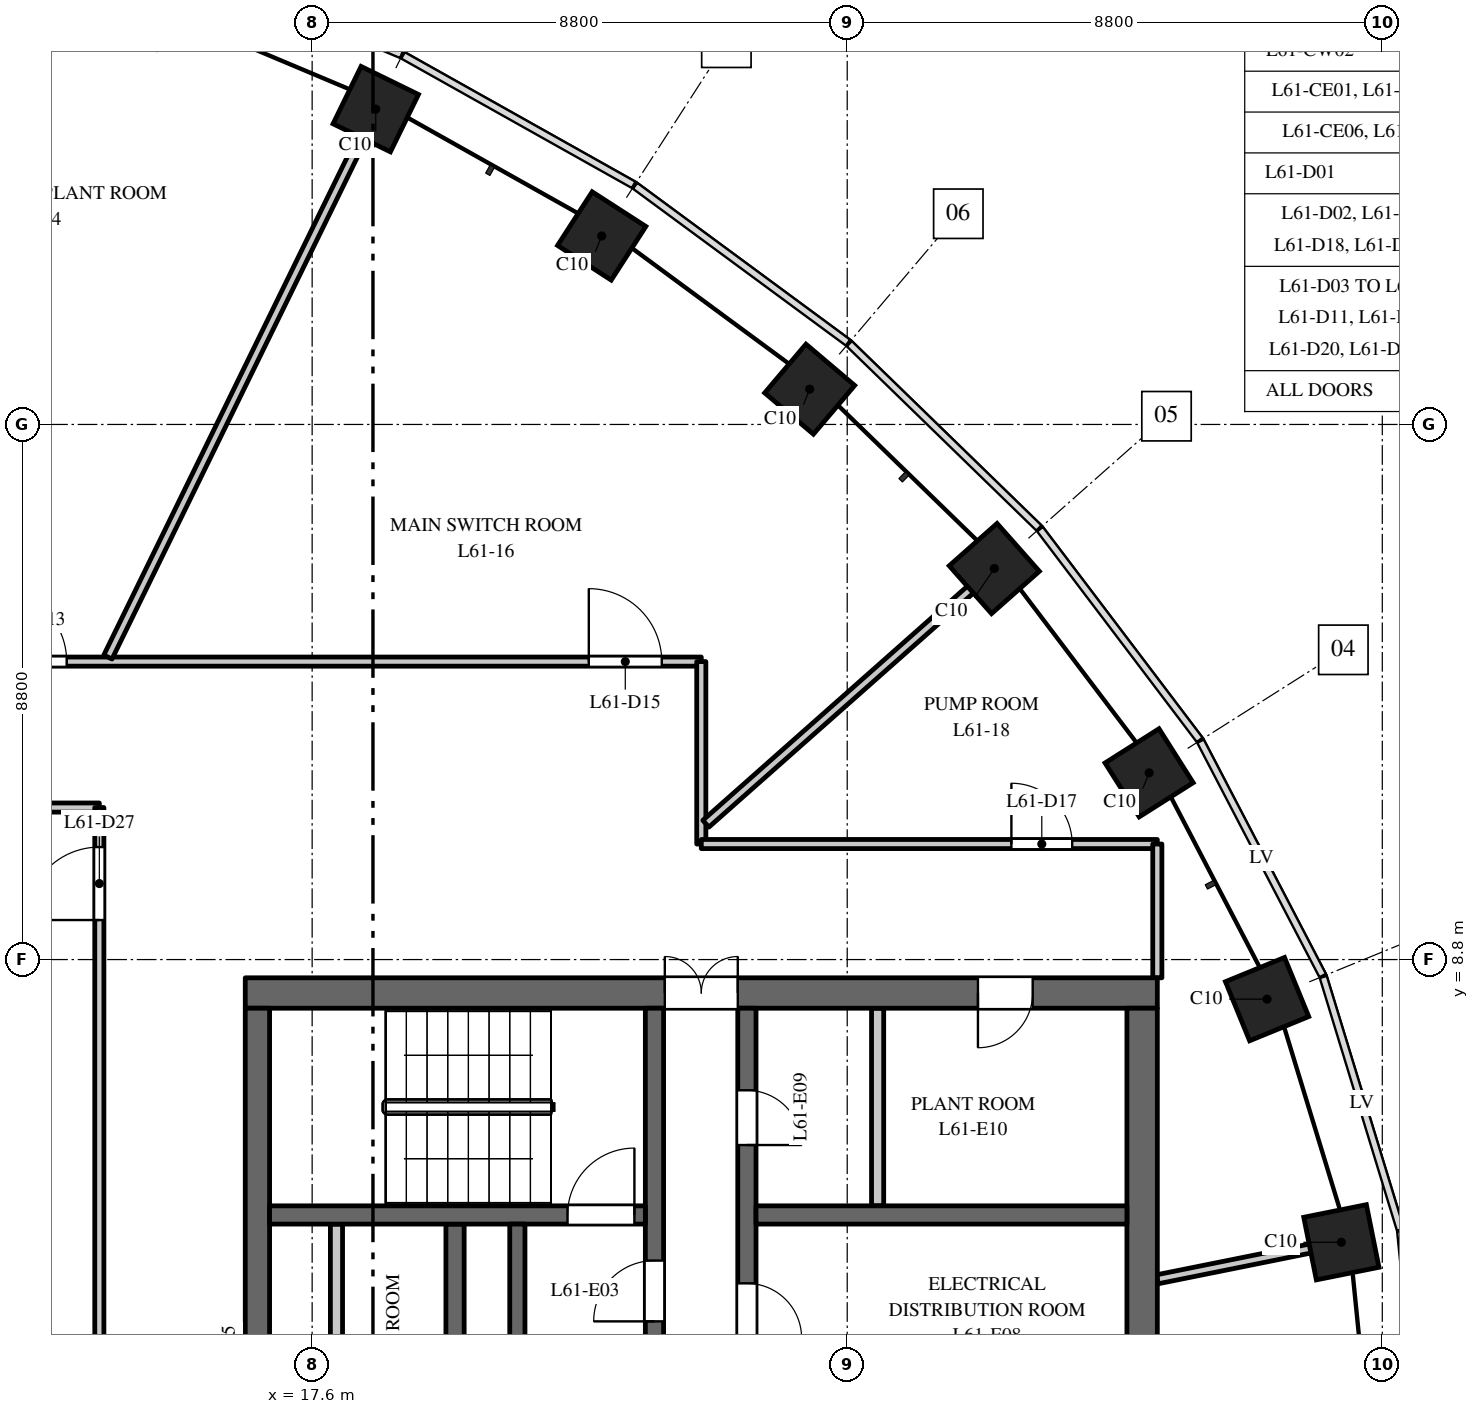
"""IFC4 building model, lengths in metres.
Left out: names, types, materials, properties, quantities, classifications, styles, units other than length and angle.
Written with IfcOpenShell. Run it as: python <this file> out.ifc"""

import sys

from ifc_helpers import new_model, si_unit, direction, frame, frame_2d, origin, origin_2d, place, context, subcontext, project, spatial, rectangle, extrude, element, fill, save


model = new_model("IFC4")
c1 = context("Model", 3, precision=1e-05, world=origin(), true_north=direction((0.0, 1.0)))
c2 = subcontext(c1, "Body", "Model", "MODEL_VIEW")
j1 = project(units=[si_unit("LENGTHUNIT", "METRE"), si_unit("PLANEANGLEUNIT", "RADIAN")], contexts=[c1])
p1 = place(None, origin())
s1 = spatial("IfcSite", under=j1, at=p1, CompositionType="ELEMENT")
p2 = place(p1, origin())
s2 = spatial("IfcBuilding", under=s1, at=p2, CompositionType="ELEMENT")
p3 = place(p2, frame((0.0, 0.0, 285.5)))
s3 = spatial("IfcBuildingStorey", under=s2, at=p3, CompositionType="ELEMENT", Elevation=285.5)
for number, where, z_axis, x_axis in (
    (1, (34.527, 4.151, 0.0), (0.0, 0.0, 1.0), (-0.197, 0.98, 0.0)),
    (2, (33.305, 8.149, 0.0), (0.0, 0.0, 1.0), (-0.379, 0.925, 0.0)),
    (3, (31.365, 11.871, 0.0), (0.0, 0.0, 1.0), (-0.535, 0.845, 0.0)),
    (4, (28.819, 15.23, 0.0), (0.0, 0.0, 1.0), (-0.663, 0.749, 0.0)),
    (5, (25.783, 18.18, 0.0), (0.0, 0.0, 1.0), (-0.763, 0.646, 0.0)),
    (6, (22.362, 20.7, 0.0), (0.0, 0.0, 1.0), (-0.84, 0.542, 0.0)),
    (7, (18.646, 22.785, 0.0), (0.0, 0.0, 1.0), (-0.898, 0.439, 0.0)),
):
    element("IfcColumn", number, at=place(p3, frame(where, z_axis=z_axis, x_axis=x_axis)), inside=s3, PredefinedType="COLUMN", context=c2, shape_type="SweptSolid", body=[
        extrude(rectangle(XDim=1.05, YDim=1.05, at=origin_2d()), origin(), (0.0, 0.0, 1.0), 5.5),
    ])
p4 = place(p3, frame((16.5, 8.25, 0.0), z_axis=(0.0, 0.0, 1.0), x_axis=(1.0, 0.0, 0.0)))
e8 = element("IfcWall", 8, at=p4, inside=s3, PredefinedType="SHEAR", context=c2, shape_type="SweptSolid", body=[
    extrude(rectangle(XDim=15.0, YDim=0.5, at=frame_2d((7.5, 0.0))), origin(), (0.0, 0.0, 1.0), 5.2),
])
p5 = place(p4, frame((6.9, 0.0, 0.0)))
e9 = element("IfcOpeningElement", 9, at=p5, cuts=e8, PredefinedType="OPENING", context=c2, shape_type="SweptSolid", body=[
    extrude(rectangle(XDim=1.2, YDim=2.1, at=frame_2d((0.6, 1.05))), frame((0.0, 0.26, 0.0), z_axis=(0.0, -1.0, 0.0), x_axis=(1.0, 0.0, 0.0)), (0.0, 0.0, 1.0), 0.52),
])
p6 = place(p4, frame((12.05, 0.0, 0.0)))
e10 = element("IfcOpeningElement", 10, at=p6, cuts=e8, PredefinedType="OPENING", context=c2, shape_type="SweptSolid", body=[
    extrude(rectangle(XDim=0.9, YDim=2.1, at=frame_2d((0.45, 1.05))), frame((0.0, 0.26, 0.0), z_axis=(0.0, -1.0, 0.0), x_axis=(1.0, 0.0, 0.0)), (0.0, 0.0, 1.0), 0.52),
])
p7 = place(p3, frame((18.0, -0.45, 0.0), z_axis=(0.0, 0.0, 1.0), x_axis=(0.0, 1.0, 0.0)))
e11 = element("IfcWall", 11, at=p7, inside=s3, PredefinedType="PARTITIONING", context=c2, shape_type="SweptSolid", body=[
    extrude(rectangle(XDim=4.9, YDim=0.2, at=frame_2d((2.45, 0.0))), origin(), (0.0, 0.0, 1.0), 5.2),
])
p8 = place(p7, frame((2.0, 0.0, 0.0)))
e12 = element("IfcOpeningElement", 12, at=p8, cuts=e11, PredefinedType="OPENING", context=c2, shape_type="SweptSolid", body=[
    extrude(rectangle(XDim=0.9, YDim=2.1, at=frame_2d((0.45, 1.05))), frame((0.0, 0.11, 0.0), z_axis=(0.0, -1.0, 0.0), x_axis=(1.0, 0.0, 0.0)), (0.0, 0.0, 1.0), 0.22),
])
p9 = place(p3, frame((19.95, -4.45, 0.0), z_axis=(0.0, 0.0, 1.0), x_axis=(0.0, 1.0, 0.0)))
e13 = element("IfcWall", 13, at=p9, inside=s3, PredefinedType="SHEAR", context=c2, shape_type="SweptSolid", body=[
    extrude(rectangle(XDim=8.9, YDim=0.3, at=frame_2d((4.45, 0.0))), origin(), (0.0, 0.0, 1.0), 5.2),
])
p10 = place(p9, frame((0.775, 0.0, 0.0)))
e14 = element("IfcOpeningElement", 14, at=p10, cuts=e13, PredefinedType="OPENING", context=c2, shape_type="SweptSolid", body=[
    extrude(rectangle(XDim=1.2, YDim=2.1, at=frame_2d((0.6, 1.05))), frame((0.0, 0.16, 0.0), z_axis=(0.0, -1.0, 0.0), x_axis=(1.0, 0.0, 0.0)), (0.0, 0.0, 1.0), 0.32),
])
p11 = place(p9, frame((6.0, 0.0, 0.0)))
e15 = element("IfcOpeningElement", 15, at=p11, cuts=e13, PredefinedType="OPENING", context=c2, shape_type="SweptSolid", body=[
    extrude(rectangle(XDim=0.9, YDim=2.1, at=frame_2d((0.45, 1.05))), frame((0.0, 0.16, 0.0), z_axis=(0.0, -1.0, 0.0), x_axis=(1.0, 0.0, 0.0)), (0.0, 0.0, 1.0), 0.32),
])
p12 = place(p3, frame((24.75, -8.0, 0.0), z_axis=(0.0, 0.0, 1.0), x_axis=(0.0, 1.0, 0.0)))
e16 = element("IfcWall", 16, at=p12, inside=s3, PredefinedType="SHEAR", context=c2, shape_type="SweptSolid", body=[
    extrude(rectangle(XDim=16.0, YDim=0.3, at=frame_2d((8.0, 0.0))), origin(), (0.0, 0.0, 1.0), 5.2),
])
p13 = place(p12, frame((4.525, 0.0, 0.0)))
e17 = element("IfcOpeningElement", 17, at=p13, cuts=e16, PredefinedType="OPENING", context=c2, shape_type="SweptSolid", body=[
    extrude(rectangle(XDim=0.9, YDim=2.1, at=frame_2d((0.45, 1.05))), frame((0.0, 0.16, 0.0), z_axis=(0.0, -1.0, 0.0), x_axis=(1.0, 0.0, 0.0)), (0.0, 0.0, 1.0), 0.32),
])
p14 = place(p12, frame((7.55, 0.0, 0.0)))
e18 = element("IfcOpeningElement", 18, at=p14, cuts=e16, PredefinedType="OPENING", context=c2, shape_type="SweptSolid", body=[
    extrude(rectangle(XDim=0.9, YDim=2.1, at=frame_2d((0.45, 1.05))), frame((0.0, 0.16, 0.0), z_axis=(0.0, -1.0, 0.0), x_axis=(1.0, 0.0, 0.0)), (0.0, 0.0, 1.0), 0.32),
])
p15 = place(p12, frame((10.575, 0.0, 0.0)))
e19 = element("IfcOpeningElement", 19, at=p15, cuts=e16, PredefinedType="OPENING", context=c2, shape_type="SweptSolid", body=[
    extrude(rectangle(XDim=0.9, YDim=2.1, at=frame_2d((0.45, 1.05))), frame((0.0, 0.16, 0.0), z_axis=(0.0, -1.0, 0.0), x_axis=(1.0, 0.0, 0.0)), (0.0, 0.0, 1.0), 0.32),
])
p16 = place(p12, frame((13.75, 0.0, 0.0)))
e20 = element("IfcOpeningElement", 20, at=p16, cuts=e16, PredefinedType="OPENING", context=c2, shape_type="SweptSolid", body=[
    extrude(rectangle(XDim=0.9, YDim=2.1, at=frame_2d((0.45, 1.05))), frame((0.0, 0.16, 0.0), z_axis=(0.0, -1.0, 0.0), x_axis=(1.0, 0.0, 0.0)), (0.0, 0.0, 1.0), 0.32),
])
p17 = place(p12, frame((1.35, 0.0, 0.0)))
e21 = element("IfcOpeningElement", 21, at=p17, cuts=e16, PredefinedType="OPENING", context=c2, shape_type="SweptSolid", body=[
    extrude(rectangle(XDim=0.9, YDim=2.1, at=frame_2d((0.45, 1.05))), frame((0.0, 0.16, 0.0), z_axis=(0.0, -1.0, 0.0), x_axis=(1.0, 0.0, 0.0)), (0.0, 0.0, 1.0), 0.32),
])
p18 = place(p3, frame((16.7, -8.0, 0.0), z_axis=(0.0, 0.0, 1.0), x_axis=(0.0, 1.0, 0.0)))
e22 = element("IfcWall", 22, at=p18, inside=s3, PredefinedType="SHEAR", context=c2, shape_type="SweptSolid", body=[
    extrude(rectangle(XDim=16.0, YDim=0.4, at=frame_2d((8.0, 0.0))), origin(), (0.0, 0.0, 1.0), 5.2),
])
p19 = place(p3, frame((31.25, -8.0, 0.0), z_axis=(0.0, 0.0, 1.0), x_axis=(0.0, 1.0, 0.0)))
e23 = element("IfcWall", 23, at=p19, inside=s3, PredefinedType="SHEAR", context=c2, shape_type="SweptSolid", body=[
    extrude(rectangle(XDim=16.0, YDim=0.5, at=frame_2d((8.0, 0.0))), origin(), (0.0, 0.0, 1.0), 5.2),
])
p20 = place(p3, frame((24.9, 4.6, 0.0), z_axis=(0.0, 0.0, 1.0), x_axis=(1.0, 0.0, 0.0)))
e24 = element("IfcWall", 24, at=p20, inside=s3, PredefinedType="SHEAR", context=c2, shape_type="SweptSolid", body=[
    extrude(rectangle(XDim=6.1, YDim=0.3, at=frame_2d((3.05, 0.0))), origin(), (0.0, 0.0, 1.0), 5.2),
])
p21 = place(p3, frame((26.9, 4.75, 0.0), z_axis=(0.0, 0.0, 1.0), x_axis=(0.0, 1.0, 0.0)))
e25 = element("IfcWall", 25, at=p21, inside=s3, PredefinedType="PARTITIONING", context=c2, shape_type="SweptSolid", body=[
    extrude(rectangle(XDim=3.25, YDim=0.2, at=frame_2d((1.625, 0.0))), origin(), (0.0, 0.0, 1.0), 5.2),
])
p22 = place(p3, frame((23.23, 2.25, 0.0), z_axis=(0.0, 0.0, 1.0), x_axis=(0.0, 1.0, 0.0)))
e26 = element("IfcWall", 26, at=p22, inside=s3, PredefinedType="SHEAR", context=c2, shape_type="SweptSolid", body=[
    extrude(rectangle(XDim=5.75, YDim=0.3, at=frame_2d((2.875, 0.0))), origin(), (0.0, 0.0, 1.0), 5.2),
])
p23 = place(p22, frame((0.6, 0.0, 0.0)))
e27 = element("IfcOpeningElement", 27, at=p23, cuts=e26, PredefinedType="OPENING", context=c2, shape_type="SweptSolid", body=[
    extrude(rectangle(XDim=1.0, YDim=2.1, at=frame_2d((0.5, 1.05))), frame((0.0, 0.16, 0.0), z_axis=(0.0, -1.0, 0.0), x_axis=(1.0, 0.0, 0.0)), (0.0, 0.0, 1.0), 0.32),
])
p24 = place(p3, frame((16.9, 4.6, 0.0), z_axis=(0.0, 0.0, 1.0), x_axis=(1.0, 0.0, 0.0)))
e28 = element("IfcWall", 28, at=p24, inside=s3, PredefinedType="SHEAR", context=c2, shape_type="SweptSolid", body=[
    extrude(rectangle(XDim=6.18, YDim=0.3, at=frame_2d((3.09, 0.0))), origin(), (0.0, 0.0, 1.0), 5.2),
])
p25 = place(p24, frame((4.9, 0.0, 0.0)))
e29 = element("IfcOpeningElement", 29, at=p25, cuts=e28, PredefinedType="OPENING", context=c2, shape_type="SweptSolid", body=[
    extrude(rectangle(XDim=1.1, YDim=2.1, at=frame_2d((0.55, 1.05))), frame((0.0, 0.16, 0.0), z_axis=(0.0, -1.0, 0.0), x_axis=(1.0, 0.0, 0.0)), (0.0, 0.0, 1.0), 0.32),
])
p26 = place(p3, frame((20.975, 2.25, 0.0), z_axis=(0.0, 0.0, 1.0), x_axis=(0.0, 1.0, 0.0)))
e30 = element("IfcWall", 30, at=p26, inside=s3, PredefinedType="SHEAR", context=c2, shape_type="SweptSolid", body=[
    extrude(rectangle(XDim=2.2, YDim=0.25, at=frame_2d((1.1, 0.0))), origin(), (0.0, 0.0, 1.0), 5.2),
])
p27 = place(p3, frame((-14.1, 11.3, 0.0), z_axis=(0.0, 0.0, 1.0), x_axis=(1.0, 0.0, 0.0)))
e31 = element("IfcWall", 31, at=p27, inside=s3, PredefinedType="PARTITIONING", context=c2, shape_type="SweptSolid", body=[
    extrude(rectangle(XDim=28.2, YDim=0.15, at=frame_2d((14.1, 0.0))), origin(), (0.0, 0.0, 1.0), 4.35),
])
p28 = place(p27, frame((12.08, 0.0, 0.0)))
e32 = element("IfcOpeningElement", 32, at=p28, cuts=e31, PredefinedType="OPENING", context=c2, shape_type="SweptSolid", body=[
    extrude(rectangle(XDim=1.0, YDim=2.1, at=frame_2d((0.5, 1.05))), frame((0.0, 0.085, 0.0), z_axis=(0.0, -1.0, 0.0), x_axis=(1.0, 0.0, 0.0)), (0.0, 0.0, 1.0), 0.17),
])
p29 = place(p27, frame((16.78, 0.0, 0.0)))
e33 = element("IfcOpeningElement", 33, at=p29, cuts=e31, PredefinedType="OPENING", context=c2, shape_type="SweptSolid", body=[
    extrude(rectangle(XDim=1.0, YDim=2.1, at=frame_2d((0.5, 1.05))), frame((0.0, 0.085, 0.0), z_axis=(0.0, -1.0, 0.0), x_axis=(1.0, 0.0, 0.0)), (0.0, 0.0, 1.0), 0.17),
])
p30 = place(p27, frame((21.48, 0.0, 0.0)))
e34 = element("IfcOpeningElement", 34, at=p30, cuts=e31, PredefinedType="OPENING", context=c2, shape_type="SweptSolid", body=[
    extrude(rectangle(XDim=1.0, YDim=2.1, at=frame_2d((0.5, 1.05))), frame((0.0, 0.085, 0.0), z_axis=(0.0, -1.0, 0.0), x_axis=(1.0, 0.0, 0.0)), (0.0, 0.0, 1.0), 0.17),
])
p31 = place(p3, frame((4.58, 13.7, 0.0), z_axis=(0.0, 0.0, 1.0), x_axis=(1.0, 0.0, 0.0)))
e35 = element("IfcWall", 35, at=p31, inside=s3, PredefinedType="PARTITIONING", context=c2, shape_type="SweptSolid", body=[
    extrude(rectangle(XDim=19.42, YDim=0.15, at=frame_2d((9.71, 0.0))), origin(), (0.0, 0.0, 1.0), 4.35),
])
p32 = place(p31, frame((7.783, 0.0, 0.0)))
e36 = element("IfcOpeningElement", 36, at=p32, cuts=e35, PredefinedType="OPENING", context=c2, shape_type="SweptSolid", body=[
    extrude(rectangle(XDim=1.2, YDim=2.1, at=frame_2d((0.6, 1.05))), frame((0.0, 0.085, 0.0), z_axis=(0.0, -1.0, 0.0), x_axis=(1.0, 0.0, 0.0)), (0.0, 0.0, 1.0), 0.17),
])
p33 = place(p31, frame((17.57, 0.0, 0.0)))
e37 = element("IfcOpeningElement", 37, at=p33, cuts=e35, PredefinedType="OPENING", context=c2, shape_type="SweptSolid", body=[
    extrude(rectangle(XDim=1.2, YDim=2.1, at=frame_2d((0.6, 1.05))), frame((0.0, 0.085, 0.0), z_axis=(0.0, -1.0, 0.0), x_axis=(1.0, 0.0, 0.0)), (0.0, 0.0, 1.0), 0.17),
])
p34 = place(p3, frame((14.1, -11.3, 0.0), z_axis=(0.0, 0.0, 1.0), x_axis=(0.0, 1.0, 0.0)))
e38 = element("IfcWall", 38, at=p34, inside=s3, PredefinedType="PARTITIONING", context=c2, shape_type="SweptSolid", body=[
    extrude(rectangle(XDim=22.6, YDim=0.15, at=frame_2d((11.3, 0.0))), origin(), (0.0, 0.0, 1.0), 4.25),
])
p35 = place(p34, frame((20.75, 0.0, 0.0)))
e39 = element("IfcOpeningElement", 39, at=p35, cuts=e38, PredefinedType="OPENING", context=c2, shape_type="SweptSolid", body=[
    extrude(rectangle(XDim=1.2, YDim=2.1, at=frame_2d((0.6, 1.05))), frame((0.0, 0.085, 0.0), z_axis=(0.0, -1.0, 0.0), x_axis=(1.0, 0.0, 0.0)), (0.0, 0.0, 1.0), 0.17),
])
p36 = place(p3, frame((14.241, 13.775, 0.0), z_axis=(0.0, 0.0, 1.0), x_axis=(0.439213157978, 0.898382881548, 0.0)))
e40 = element("IfcWall", 40, at=p36, inside=s3, PredefinedType="PARTITIONING", context=c2, shape_type="SweptSolid", body=[
    extrude(rectangle(XDim=10.129, YDim=0.15, at=frame_2d((5.065, 0.0))), origin(), (0.0, 0.0, 1.0), 5.2),
])
p37 = place(p3, frame((24.0, 10.7, 0.0), z_axis=(0.0, 0.0, 1.0), x_axis=(0.0, 1.0, 0.0)))
e41 = element("IfcWall", 41, at=p37, inside=s3, PredefinedType="PARTITIONING", context=c2, shape_type="SweptSolid", body=[
    extrude(rectangle(XDim=3.0, YDim=0.15, at=frame_2d((1.5, 0.0))), origin(), (0.0, 0.0, 1.0), 4.25),
])
p38 = place(p3, frame((24.0, 10.7, 0.0), z_axis=(0.0, 0.0, 1.0), x_axis=(1.0, 0.0, 0.0)))
e42 = element("IfcWall", 42, at=p38, inside=s3, PredefinedType="PARTITIONING", context=c2, shape_type="SweptSolid", body=[
    extrude(rectangle(XDim=7.5, YDim=0.15, at=frame_2d((3.75, 0.0))), origin(), (0.0, 0.0, 1.0), 5.2),
])
p39 = place(p38, frame((5.1, 0.0, 0.0)))
e43 = element("IfcOpeningElement", 43, at=p39, cuts=e42, PredefinedType="OPENING", context=c2, shape_type="SweptSolid", body=[
    extrude(rectangle(XDim=1.0, YDim=2.1, at=frame_2d((0.5, 1.05))), frame((0.0, 0.085, 0.0), z_axis=(0.0, -1.0, 0.0), x_axis=(1.0, 0.0, 0.0)), (0.0, 0.0, 1.0), 0.17),
])
p40 = place(p3, frame((24.075, 11.034, 0.0), z_axis=(0.0, 0.0, 1.0), x_axis=(0.748919053688, 0.662661490524, 0.0)))
e44 = element("IfcWall", 44, at=p40, inside=s3, PredefinedType="PARTITIONING", context=c2, shape_type="SweptSolid", body=[
    extrude(rectangle(XDim=6.433, YDim=0.15, at=frame_2d((3.217, 0.0))), origin(), (0.0, 0.0, 1.0), 4.25),
])
p41 = place(p3, frame((31.5, 3.542, 0.0), z_axis=(0.0, 0.0, 1.0), x_axis=(0.98034430806, 0.197294291997, 0.0)))
e45 = element("IfcWall", 45, at=p41, inside=s3, PredefinedType="PARTITIONING", context=c2, shape_type="SweptSolid", body=[
    extrude(rectangle(XDim=3.188, YDim=0.15, at=frame_2d((1.594, 0.0))), origin(), (0.0, 0.0, 1.0), 5.2),
])
p42 = place(p3, frame((31.5, 8.5, 0.0), z_axis=(0.0, 0.0, 1.0), x_axis=(0.0, 1.0, 0.0)))
e46 = element("IfcWall", 46, at=p42, inside=s3, PredefinedType="PARTITIONING", context=c2, shape_type="SweptSolid", body=[
    extrude(rectangle(XDim=2.2, YDim=0.15, at=frame_2d((1.1, 0.0))), origin(), (0.0, 0.0, 1.0), 5.2),
])
p43 = place(p25, origin())
e47 = element("IfcDoor", 47, at=p43, inside=s3, OperationType="SINGLE_SWING_LEFT", PredefinedType="DOOR", context=c2, shape_type="SweptSolid", body=[
    extrude(rectangle(XDim=1.1, YDim=2.1, at=frame_2d((0.55, 1.05))), frame((0.0, 0.025, 0.0), z_axis=(0.0, -1.0, 0.0), x_axis=(1.0, 0.0, 0.0)), (0.0, 0.0, 1.0), 0.05),
])
fill(e29, e47)
p44 = place(p23, origin())
e48 = element("IfcDoor", 48, at=p44, inside=s3, OperationType="SINGLE_SWING_RIGHT", PredefinedType="DOOR", context=c2, shape_type="SweptSolid", body=[
    extrude(rectangle(XDim=1.0, YDim=2.1, at=frame_2d((0.5, 1.05))), frame((0.0, 0.025, 0.0), z_axis=(0.0, -1.0, 0.0), x_axis=(1.0, 0.0, 0.0)), (0.0, 0.0, 1.0), 0.05),
])
fill(e27, e48)
p45 = place(p5, origin())
e49 = element("IfcDoor", 49, at=p45, inside=s3, OperationType="DOUBLE_DOOR_DOUBLE_SWING", PredefinedType="DOOR", context=c2, shape_type="SweptSolid", body=[
    extrude(rectangle(XDim=1.2, YDim=2.1, at=frame_2d((0.6, 1.05))), frame((0.0, 0.025, 0.0), z_axis=(0.0, -1.0, 0.0), x_axis=(1.0, 0.0, 0.0)), (0.0, 0.0, 1.0), 0.05),
])
fill(e9, e49)
p46 = place(p15, origin())
e50 = element("IfcDoor", 50, at=p46, inside=s3, OperationType="SINGLE_SWING_LEFT", PredefinedType="DOOR", context=c2, shape_type="SweptSolid", body=[
    extrude(rectangle(XDim=0.9, YDim=2.1, at=frame_2d((0.45, 1.05))), frame((0.0, 0.025, 0.0), z_axis=(0.0, -1.0, 0.0), x_axis=(1.0, 0.0, 0.0)), (0.0, 0.0, 1.0), 0.05),
])
fill(e19, e50)
p47 = place(p16, origin())
e51 = element("IfcDoor", 51, at=p47, inside=s3, OperationType="SINGLE_SWING_LEFT", PredefinedType="DOOR", context=c2, shape_type="SweptSolid", body=[
    extrude(rectangle(XDim=0.9, YDim=2.1, at=frame_2d((0.45, 1.05))), frame((0.0, 0.025, 0.0), z_axis=(0.0, -1.0, 0.0), x_axis=(1.0, 0.0, 0.0)), (0.0, 0.0, 1.0), 0.05),
])
fill(e20, e51)
p48 = place(p6, origin())
e52 = element("IfcDoor", 52, at=p48, inside=s3, OperationType="SINGLE_SWING_LEFT", PredefinedType="DOOR", context=c2, shape_type="SweptSolid", body=[
    extrude(rectangle(XDim=0.9, YDim=2.1, at=frame_2d((0.45, 1.05))), frame((0.0, 0.025, 0.0), z_axis=(0.0, -1.0, 0.0), x_axis=(1.0, 0.0, 0.0)), (0.0, 0.0, 1.0), 0.05),
])
fill(e10, e52)
p49 = place(p32, origin())
e53 = element("IfcDoor", 53, at=p49, inside=s3, OperationType="SINGLE_SWING_LEFT", PredefinedType="DOOR", context=c2, shape_type="SweptSolid", body=[
    extrude(rectangle(XDim=1.2, YDim=2.1, at=frame_2d((0.6, 1.05))), frame((0.0, 0.025, 0.0), z_axis=(0.0, -1.0, 0.0), x_axis=(1.0, 0.0, 0.0)), (0.0, 0.0, 1.0), 0.05),
])
fill(e36, e53)
p50 = place(p33, origin())
e54 = element("IfcDoor", 54, at=p50, inside=s3, OperationType="SINGLE_SWING_LEFT", PredefinedType="DOOR", context=c2, shape_type="SweptSolid", body=[
    extrude(rectangle(XDim=1.2, YDim=2.1, at=frame_2d((0.6, 1.05))), frame((0.0, 0.025, 0.0), z_axis=(0.0, -1.0, 0.0), x_axis=(1.0, 0.0, 0.0)), (0.0, 0.0, 1.0), 0.05),
])
fill(e37, e54)
p51 = place(p39, origin())
e55 = element("IfcDoor", 55, at=p51, inside=s3, OperationType="SINGLE_SWING_LEFT", PredefinedType="DOOR", context=c2, shape_type="SweptSolid", body=[
    extrude(rectangle(XDim=1.0, YDim=2.1, at=frame_2d((0.5, 1.05))), frame((0.0, 0.025, 0.0), z_axis=(0.0, -1.0, 0.0), x_axis=(1.0, 0.0, 0.0)), (0.0, 0.0, 1.0), 0.05),
])
fill(e43, e55)
p52 = place(p35, origin())
e56 = element("IfcDoor", 56, at=p52, inside=s3, OperationType="SINGLE_SWING_LEFT", PredefinedType="DOOR", context=c2, shape_type="SweptSolid", body=[
    extrude(rectangle(XDim=1.2, YDim=2.1, at=frame_2d((0.6, 1.05))), frame((0.0, 0.025, 0.0), z_axis=(0.0, -1.0, 0.0), x_axis=(1.0, 0.0, 0.0)), (0.0, 0.0, 1.0), 0.05),
])
fill(e39, e56)
save(model, sys.argv[1])
